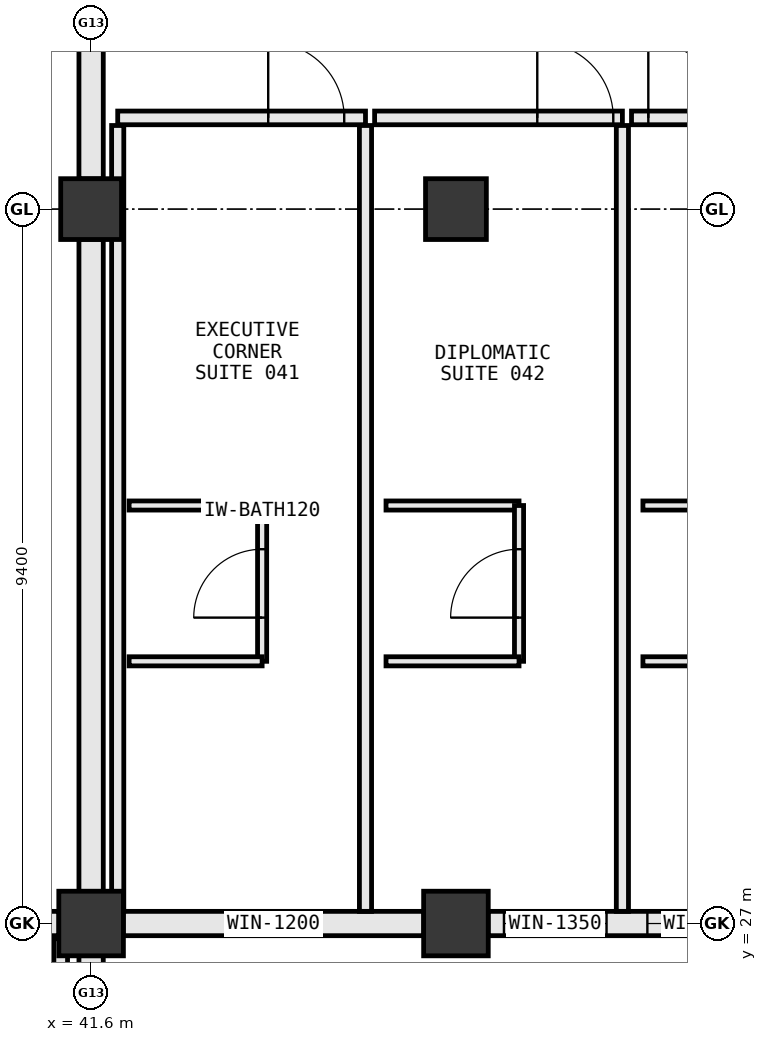
"""IFC4 building model, lengths in metres.
Left out: names, types, materials, properties, quantities, classifications, styles, units other than length and angle.
Written with IfcOpenShell. Run it as: python <this file> out.ifc"""

import sys

from ifc_helpers import new_model, si_unit, direction, frame, frame_2d, origin, origin_2d, place, context, subcontext, project, spatial, rectangle, extrude, element, fill, save


model = new_model("IFC4")
c1 = context("Model", 3, precision=1e-05, world=origin(), true_north=direction((0.0, 1.0)))
c2 = subcontext(c1, "Body", "Model", "MODEL_VIEW")
j1 = project(units=[si_unit("LENGTHUNIT", "METRE"), si_unit("PLANEANGLEUNIT", "RADIAN")], contexts=[c1])
p1 = place(None, origin())
s1 = spatial("IfcSite", under=j1, at=p1, CompositionType="ELEMENT")
p2 = place(p1, origin())
s2 = spatial("IfcBuilding", under=s1, at=p2, CompositionType="ELEMENT")
p3 = place(p2, frame((0.0, 0.0, 10.8)))
s3 = spatial("IfcBuildingStorey", under=s2, at=p3, CompositionType="ELEMENT", Elevation=10.8)
p4 = place(p3, frame((41.6, 27.0, 0.0), z_axis=(0.0, 0.0, 1.0), x_axis=(1.0, 0.0, 0.0)))
e1 = element("IfcColumn", 1, at=p4, inside=s3, PredefinedType="COLUMN", context=c2, shape_type="SweptSolid", body=[
    extrude(rectangle(XDim=0.85, YDim=0.85, at=origin_2d()), origin(), (0.0, 0.0, 1.0), 5.4),
])
p5 = place(p3, frame((41.6, 36.4, 0.0), z_axis=(0.0, 0.0, 1.0), x_axis=(1.0, 0.0, 0.0)))
e2 = element("IfcColumn", 2, at=p5, inside=s3, PredefinedType="COLUMN", context=c2, shape_type="SweptSolid", body=[
    extrude(rectangle(XDim=0.8, YDim=0.8, at=origin_2d()), origin(), (0.0, 0.0, 1.0), 5.4),
])
p6 = place(p3, frame((46.4, 27.0, 0.0), z_axis=(0.0, 0.0, 1.0), x_axis=(1.0, 0.0, 0.0)))
e3 = element("IfcColumn", 3, at=p6, inside=s3, PredefinedType="COLUMN", context=c2, shape_type="SweptSolid", body=[
    extrude(rectangle(XDim=0.85, YDim=0.85, at=origin_2d()), origin(), (0.0, 0.0, 1.0), 5.4),
])
p7 = place(p3, frame((46.4, 36.4, 0.0), z_axis=(0.0, 0.0, 1.0), x_axis=(1.0, 0.0, 0.0)))
e4 = element("IfcColumn", 4, at=p7, inside=s3, PredefinedType="COLUMN", context=c2, shape_type="SweptSolid", body=[
    extrude(rectangle(XDim=0.8, YDim=0.8, at=origin_2d()), origin(), (0.0, 0.0, 1.0), 5.4),
])
p8 = place(p3, frame((41.6, 17.873, 0.0), z_axis=(0.0, 0.0, 1.0), x_axis=(0.0, 1.0, 0.0)))
e5 = element("IfcWall", 5, at=p8, inside=s3, PredefinedType="STANDARD", context=c2, shape_type="SweptSolid", body=[
    extrude(rectangle(XDim=8.704, YDim=0.32, at=frame_2d((4.352, 0.0))), origin(), (0.0, 0.0, 1.0), 4.102),
])
p9 = place(p8, frame((3.452, 0.0, 0.85)))
e6 = element("IfcOpeningElement", 6, at=p9, cuts=e5, PredefinedType="OPENING", context=c2, shape_type="SweptSolid", body=[
    extrude(rectangle(XDim=1.8, YDim=1.85, at=frame_2d((0.9, 0.925))), frame((0.0, 0.172, 0.0), z_axis=(0.0, -1.0, 0.0), x_axis=(1.0, 0.0, 0.0)), (0.0, 0.0, 1.0), 0.344),
])
p10 = place(p3, frame((41.177, 27.0, 0.0), z_axis=(0.0, 0.0, 1.0), x_axis=(-1.0, 0.0, 0.0)))
e7 = element("IfcWall", 7, at=p10, inside=s3, PredefinedType="STANDARD", context=c2, shape_type="SweptSolid", body=[
    extrude(rectangle(XDim=10.368, YDim=0.32, at=frame_2d((5.184, 0.0))), origin(), (0.0, 0.0, 1.0), 4.016),
])
p11 = place(p3, frame((41.6, 42.316, 0.0), z_axis=(0.0, 0.0, 1.0), x_axis=(0.0, -1.0, 0.0)))
e8 = element("IfcWall", 8, at=p11, inside=s3, PredefinedType="STANDARD", context=c2, shape_type="SweptSolid", body=[
    extrude(rectangle(XDim=5.518, YDim=0.32, at=frame_2d((2.759, 0.0))), origin(), (0.0, 0.0, 1.0), 4.251),
])
p12 = place(p3, frame((41.6, 36.002, 0.0), z_axis=(0.0, 0.0, 1.0), x_axis=(0.0, -1.0, 0.0)))
e9 = element("IfcWall", 9, at=p12, inside=s3, PredefinedType="STANDARD", context=c2, shape_type="SweptSolid", body=[
    extrude(rectangle(XDim=8.579, YDim=0.32, at=frame_2d((4.29, 0.0))), origin(), (0.0, 0.0, 1.0), 4.178),
])
p13 = place(p3, frame((42.023, 27.0, 0.0), z_axis=(0.0, 0.0, 1.0), x_axis=(1.0, 0.0, 0.0)))
e10 = element("IfcWall", 10, at=p13, inside=s3, PredefinedType="STANDARD", context=c2, shape_type="SweptSolid", body=[
    extrude(rectangle(XDim=3.954, YDim=0.32, at=frame_2d((1.977, 0.0))), origin(), (0.0, 0.0, 1.0), 4.183),
])
p14 = place(p13, frame((1.377, 0.0, 0.85)))
e11 = element("IfcOpeningElement", 11, at=p14, cuts=e10, PredefinedType="OPENING", context=c2, shape_type="SweptSolid", body=[
    extrude(rectangle(XDim=1.2, YDim=1.55, at=frame_2d((0.6, 0.775))), frame((0.0, 0.172, 0.0), z_axis=(0.0, -1.0, 0.0), x_axis=(1.0, 0.0, 0.0)), (0.0, 0.0, 1.0), 0.344),
])
p15 = place(p3, frame((46.823, 27.0, 0.0), z_axis=(0.0, 0.0, 1.0), x_axis=(1.0, 0.0, 0.0)))
e12 = element("IfcWall", 12, at=p15, inside=s3, PredefinedType="STANDARD", context=c2, shape_type="SweptSolid", body=[
    extrude(rectangle(XDim=3.954, YDim=0.32, at=frame_2d((1.977, 0.0))), origin(), (0.0, 0.0, 1.0), 4.183),
])
p16 = place(p15, frame((0.208, 0.0, 0.85)))
e13 = element("IfcOpeningElement", 13, at=p16, cuts=e12, PredefinedType="OPENING", context=c2, shape_type="SweptSolid", body=[
    extrude(rectangle(XDim=1.35, YDim=1.65, at=frame_2d((0.675, 0.825))), frame((0.0, 0.172, 0.0), z_axis=(0.0, -1.0, 0.0), x_axis=(1.0, 0.0, 0.0)), (0.0, 0.0, 1.0), 0.344),
])
p17 = place(p15, frame((2.095, 0.0, 0.85)))
e14 = element("IfcOpeningElement", 14, at=p17, cuts=e12, PredefinedType="OPENING", context=c2, shape_type="SweptSolid", body=[
    extrude(rectangle(XDim=1.65, YDim=1.8, at=frame_2d((0.825, 0.9))), frame((0.0, 0.172, 0.0), z_axis=(0.0, -1.0, 0.0), x_axis=(1.0, 0.0, 0.0)), (0.0, 0.0, 1.0), 0.344),
])
p18 = place(p3, frame((41.2, 24.8, 0.0), z_axis=(0.0, 0.0, 1.0), x_axis=(0.0, 1.0, 0.0)))
e15 = element("IfcWall", 15, at=p18, inside=s3, PredefinedType="PARTITIONING", context=c2, shape_type="SweptSolid", body=[
    extrude(rectangle(XDim=2.0, YDim=0.18, at=frame_2d((1.0, 0.0))), origin(), (0.0, 0.0, 1.0), 4.102),
])
p19 = place(p3, frame((45.21, 37.6, 0.0), z_axis=(0.0, 0.0, 1.0), x_axis=(-1.0, 0.0, 0.0)))
e16 = element("IfcWall", 16, at=p19, inside=s3, PredefinedType="PARTITIONING", context=c2, shape_type="SweptSolid", body=[
    extrude(rectangle(XDim=3.26, YDim=0.18, at=frame_2d((1.63, 0.0))), origin(), (0.0, 0.0, 1.0), 4.8),
])
p20 = place(p19, frame((0.28, 0.0, 0.0)))
e17 = element("IfcOpeningElement", 17, at=p20, cuts=e16, PredefinedType="OPENING", context=c2, shape_type="SweptSolid", body=[
    extrude(rectangle(XDim=1.0, YDim=2.2, at=frame_2d((0.5, 1.1))), frame((0.0, 0.102, 0.0), z_axis=(0.0, -1.0, 0.0), x_axis=(1.0, 0.0, 0.0)), (0.0, 0.0, 1.0), 0.204),
])
p21 = place(p3, frame((41.95, 27.16, 0.0), z_axis=(0.0, 0.0, 1.0), x_axis=(0.0, 1.0, 0.0)))
e18 = element("IfcWall", 18, at=p21, inside=s3, PredefinedType="PARTITIONING", context=c2, shape_type="SweptSolid", body=[
    extrude(rectangle(XDim=10.34, YDim=0.16, at=frame_2d((5.17, 0.0))), origin(), (0.0, 0.0, 1.0), 4.178),
])
p22 = place(p3, frame((45.21, 27.16, 0.0), z_axis=(0.0, 0.0, 1.0), x_axis=(0.0, 1.0, 0.0)))
e19 = element("IfcWall", 19, at=p22, inside=s3, PredefinedType="PARTITIONING", context=c2, shape_type="SweptSolid", body=[
    extrude(rectangle(XDim=10.34, YDim=0.16, at=frame_2d((5.17, 0.0))), origin(), (0.0, 0.0, 1.0), 4.8),
])
p23 = place(p3, frame((42.1, 32.5, 0.0), z_axis=(0.0, 0.0, 1.0), x_axis=(1.0, 0.0, 0.0)))
e20 = element("IfcWall", 20, at=p23, inside=s3, PredefinedType="PARTITIONING", context=c2, shape_type="SweptSolid", body=[
    extrude(rectangle(XDim=1.75, YDim=0.12, at=frame_2d((0.875, 0.0))), origin(), (0.0, 0.0, 1.0), 4.8),
])
p24 = place(p3, frame((43.85, 30.45, 0.0), z_axis=(0.0, 0.0, 1.0), x_axis=(0.0, 1.0, 0.0)))
e21 = element("IfcWall", 21, at=p24, inside=s3, PredefinedType="PARTITIONING", context=c2, shape_type="SweptSolid", body=[
    extrude(rectangle(XDim=2.05, YDim=0.12, at=frame_2d((1.025, 0.0))), origin(), (0.0, 0.0, 1.0), 4.385),
])
p25 = place(p24, frame((0.575, 0.0, 0.0)))
e22 = element("IfcOpeningElement", 22, at=p25, cuts=e21, PredefinedType="OPENING", context=c2, shape_type="SweptSolid", body=[
    extrude(rectangle(XDim=0.9, YDim=2.15, at=frame_2d((0.45, 1.075))), frame((0.0, 0.072, 0.0), z_axis=(0.0, -1.0, 0.0), x_axis=(1.0, 0.0, 0.0)), (0.0, 0.0, 1.0), 0.144),
])
p26 = place(p3, frame((42.1, 30.45, 0.0), z_axis=(0.0, 0.0, 1.0), x_axis=(1.0, 0.0, 0.0)))
e23 = element("IfcWall", 23, at=p26, inside=s3, PredefinedType="PARTITIONING", context=c2, shape_type="SweptSolid", body=[
    extrude(rectangle(XDim=1.75, YDim=0.12, at=frame_2d((0.875, 0.0))), origin(), (0.0, 0.0, 1.0), 4.8),
])
p27 = place(p3, frame((48.59, 37.6, 0.0), z_axis=(0.0, 0.0, 1.0), x_axis=(-1.0, 0.0, 0.0)))
e24 = element("IfcWall", 24, at=p27, inside=s3, PredefinedType="PARTITIONING", context=c2, shape_type="SweptSolid", body=[
    extrude(rectangle(XDim=3.26, YDim=0.18, at=frame_2d((1.63, 0.0))), origin(), (0.0, 0.0, 1.0), 4.8),
])
p28 = place(p27, frame((0.12, 0.0, 0.0)))
e25 = element("IfcOpeningElement", 25, at=p28, cuts=e24, PredefinedType="OPENING", context=c2, shape_type="SweptSolid", body=[
    extrude(rectangle(XDim=1.0, YDim=2.2, at=frame_2d((0.5, 1.1))), frame((0.0, 0.102, 0.0), z_axis=(0.0, -1.0, 0.0), x_axis=(1.0, 0.0, 0.0)), (0.0, 0.0, 1.0), 0.204),
])
p29 = place(p3, frame((48.59, 27.16, 0.0), z_axis=(0.0, 0.0, 1.0), x_axis=(0.0, 1.0, 0.0)))
e26 = element("IfcWall", 26, at=p29, inside=s3, PredefinedType="PARTITIONING", context=c2, shape_type="SweptSolid", body=[
    extrude(rectangle(XDim=10.34, YDim=0.16, at=frame_2d((5.17, 0.0))), origin(), (0.0, 0.0, 1.0), 4.378),
])
p30 = place(p3, frame((45.48, 32.5, 0.0), z_axis=(0.0, 0.0, 1.0), x_axis=(1.0, 0.0, 0.0)))
e27 = element("IfcWall", 27, at=p30, inside=s3, PredefinedType="PARTITIONING", context=c2, shape_type="SweptSolid", body=[
    extrude(rectangle(XDim=1.75, YDim=0.12, at=frame_2d((0.875, 0.0))), origin(), (0.0, 0.0, 1.0), 4.8),
])
p31 = place(p3, frame((47.23, 30.45, 0.0), z_axis=(0.0, 0.0, 1.0), x_axis=(0.0, 1.0, 0.0)))
e28 = element("IfcWall", 28, at=p31, inside=s3, PredefinedType="PARTITIONING", context=c2, shape_type="SweptSolid", body=[
    extrude(rectangle(XDim=2.05, YDim=0.12, at=frame_2d((1.025, 0.0))), origin(), (0.0, 0.0, 1.0), 4.8),
])
p32 = place(p31, frame((0.575, 0.0, 0.0)))
e29 = element("IfcOpeningElement", 29, at=p32, cuts=e28, PredefinedType="OPENING", context=c2, shape_type="SweptSolid", body=[
    extrude(rectangle(XDim=0.9, YDim=2.15, at=frame_2d((0.45, 1.075))), frame((0.0, 0.072, 0.0), z_axis=(0.0, -1.0, 0.0), x_axis=(1.0, 0.0, 0.0)), (0.0, 0.0, 1.0), 0.144),
])
p33 = place(p3, frame((45.48, 30.45, 0.0), z_axis=(0.0, 0.0, 1.0), x_axis=(1.0, 0.0, 0.0)))
e30 = element("IfcWall", 30, at=p33, inside=s3, PredefinedType="PARTITIONING", context=c2, shape_type="SweptSolid", body=[
    extrude(rectangle(XDim=1.75, YDim=0.12, at=frame_2d((0.875, 0.0))), origin(), (0.0, 0.0, 1.0), 4.8),
])
p34 = place(p3, frame((51.97, 37.6, 0.0), z_axis=(0.0, 0.0, 1.0), x_axis=(-1.0, 0.0, 0.0)))
e31 = element("IfcWall", 31, at=p34, inside=s3, PredefinedType="PARTITIONING", context=c2, shape_type="SweptSolid", body=[
    extrude(rectangle(XDim=3.26, YDim=0.18, at=frame_2d((1.63, 0.0))), origin(), (0.0, 0.0, 1.0), 4.8),
])
p35 = place(p34, frame((2.039, 0.0, 0.0)))
e32 = element("IfcOpeningElement", 32, at=p35, cuts=e31, PredefinedType="OPENING", context=c2, shape_type="SweptSolid", body=[
    extrude(rectangle(XDim=1.0, YDim=2.2, at=frame_2d((0.5, 1.1))), frame((0.0, 0.102, 0.0), z_axis=(0.0, -1.0, 0.0), x_axis=(1.0, 0.0, 0.0)), (0.0, 0.0, 1.0), 0.204),
])
for number, where, z_axis, x_axis in (
    (33, (48.86, 32.5, 0.0), (0.0, 0.0, 1.0), (1.0, 0.0, 0.0)),
    (34, (48.86, 30.45, 0.0), (0.0, 0.0, 1.0), (1.0, 0.0, 0.0)),
):
    element("IfcWall", number, at=place(p3, frame(where, z_axis=z_axis, x_axis=x_axis)), inside=s3, PredefinedType="PARTITIONING", context=c2, shape_type="SweptSolid", body=[
        extrude(rectangle(XDim=1.75, YDim=0.12, at=frame_2d((0.875, 0.0))), origin(), (0.0, 0.0, 1.0), 4.8),
    ])
p36 = place(p14, origin())
e35 = element("IfcWindow", 35, at=p36, inside=s3, PartitioningType="SINGLE_PANEL", PredefinedType="WINDOW", context=c2, shape_type="SweptSolid", body=[
    extrude(rectangle(XDim=1.2, YDim=1.55, at=frame_2d((0.6, 0.775))), frame((0.0, 0.03, 0.0), z_axis=(0.0, -1.0, 0.0), x_axis=(1.0, 0.0, 0.0)), (0.0, 0.0, 1.0), 0.06),
])
fill(e11, e35)
p37 = place(p16, origin())
e36 = element("IfcWindow", 36, at=p37, inside=s3, PartitioningType="SINGLE_PANEL", PredefinedType="WINDOW", context=c2, shape_type="SweptSolid", body=[
    extrude(rectangle(XDim=1.35, YDim=1.65, at=frame_2d((0.675, 0.825))), frame((0.0, 0.03, 0.0), z_axis=(0.0, -1.0, 0.0), x_axis=(1.0, 0.0, 0.0)), (0.0, 0.0, 1.0), 0.06),
])
fill(e13, e36)
p38 = place(p17, origin())
e37 = element("IfcWindow", 37, at=p38, inside=s3, PartitioningType="SINGLE_PANEL", PredefinedType="WINDOW", context=c2, shape_type="SweptSolid", body=[
    extrude(rectangle(XDim=1.65, YDim=1.8, at=frame_2d((0.825, 0.9))), frame((0.0, 0.03, 0.0), z_axis=(0.0, -1.0, 0.0), x_axis=(1.0, 0.0, 0.0)), (0.0, 0.0, 1.0), 0.06),
])
fill(e14, e37)
p39 = place(p20, frame((1.0, 0.0, 0.0), z_axis=(0.0, 0.0, 1.0), x_axis=(-1.0, 0.0, 0.0)))
e38 = element("IfcDoor", 38, at=p39, inside=s3, OperationType="SINGLE_SWING_RIGHT", PredefinedType="DOOR", context=c2, shape_type="SweptSolid", body=[
    extrude(rectangle(XDim=1.0, YDim=2.2, at=frame_2d((0.5, 1.1))), frame((0.0, 0.025, 0.0), z_axis=(0.0, -1.0, 0.0), x_axis=(1.0, 0.0, 0.0)), (0.0, 0.0, 1.0), 0.05),
])
fill(e17, e38)
p40 = place(p25, origin())
e39 = element("IfcDoor", 39, at=p40, inside=s3, OperationType="SINGLE_SWING_LEFT", PredefinedType="DOOR", context=c2, shape_type="SweptSolid", body=[
    extrude(rectangle(XDim=0.9, YDim=2.15, at=frame_2d((0.45, 1.075))), frame((0.0, 0.025, 0.0), z_axis=(0.0, -1.0, 0.0), x_axis=(1.0, 0.0, 0.0)), (0.0, 0.0, 1.0), 0.05),
])
fill(e22, e39)
p41 = place(p28, frame((1.0, 0.0, 0.0), z_axis=(0.0, 0.0, 1.0), x_axis=(-1.0, 0.0, 0.0)))
e40 = element("IfcDoor", 40, at=p41, inside=s3, OperationType="SINGLE_SWING_RIGHT", PredefinedType="DOOR", context=c2, shape_type="SweptSolid", body=[
    extrude(rectangle(XDim=1.0, YDim=2.2, at=frame_2d((0.5, 1.1))), frame((0.0, 0.025, 0.0), z_axis=(0.0, -1.0, 0.0), x_axis=(1.0, 0.0, 0.0)), (0.0, 0.0, 1.0), 0.05),
])
fill(e25, e40)
p42 = place(p32, origin())
e41 = element("IfcDoor", 41, at=p42, inside=s3, OperationType="SINGLE_SWING_LEFT", PredefinedType="DOOR", context=c2, shape_type="SweptSolid", body=[
    extrude(rectangle(XDim=0.9, YDim=2.15, at=frame_2d((0.45, 1.075))), frame((0.0, 0.025, 0.0), z_axis=(0.0, -1.0, 0.0), x_axis=(1.0, 0.0, 0.0)), (0.0, 0.0, 1.0), 0.05),
])
fill(e29, e41)
p43 = place(p35, frame((1.0, 0.0, 0.0), z_axis=(0.0, 0.0, 1.0), x_axis=(-1.0, 0.0, 0.0)))
e42 = element("IfcDoor", 42, at=p43, inside=s3, OperationType="SINGLE_SWING_RIGHT", PredefinedType="DOOR", context=c2, shape_type="SweptSolid", body=[
    extrude(rectangle(XDim=1.0, YDim=2.2, at=frame_2d((0.5, 1.1))), frame((0.0, 0.025, 0.0), z_axis=(0.0, -1.0, 0.0), x_axis=(1.0, 0.0, 0.0)), (0.0, 0.0, 1.0), 0.05),
])
fill(e32, e42)
save(model, sys.argv[1])
